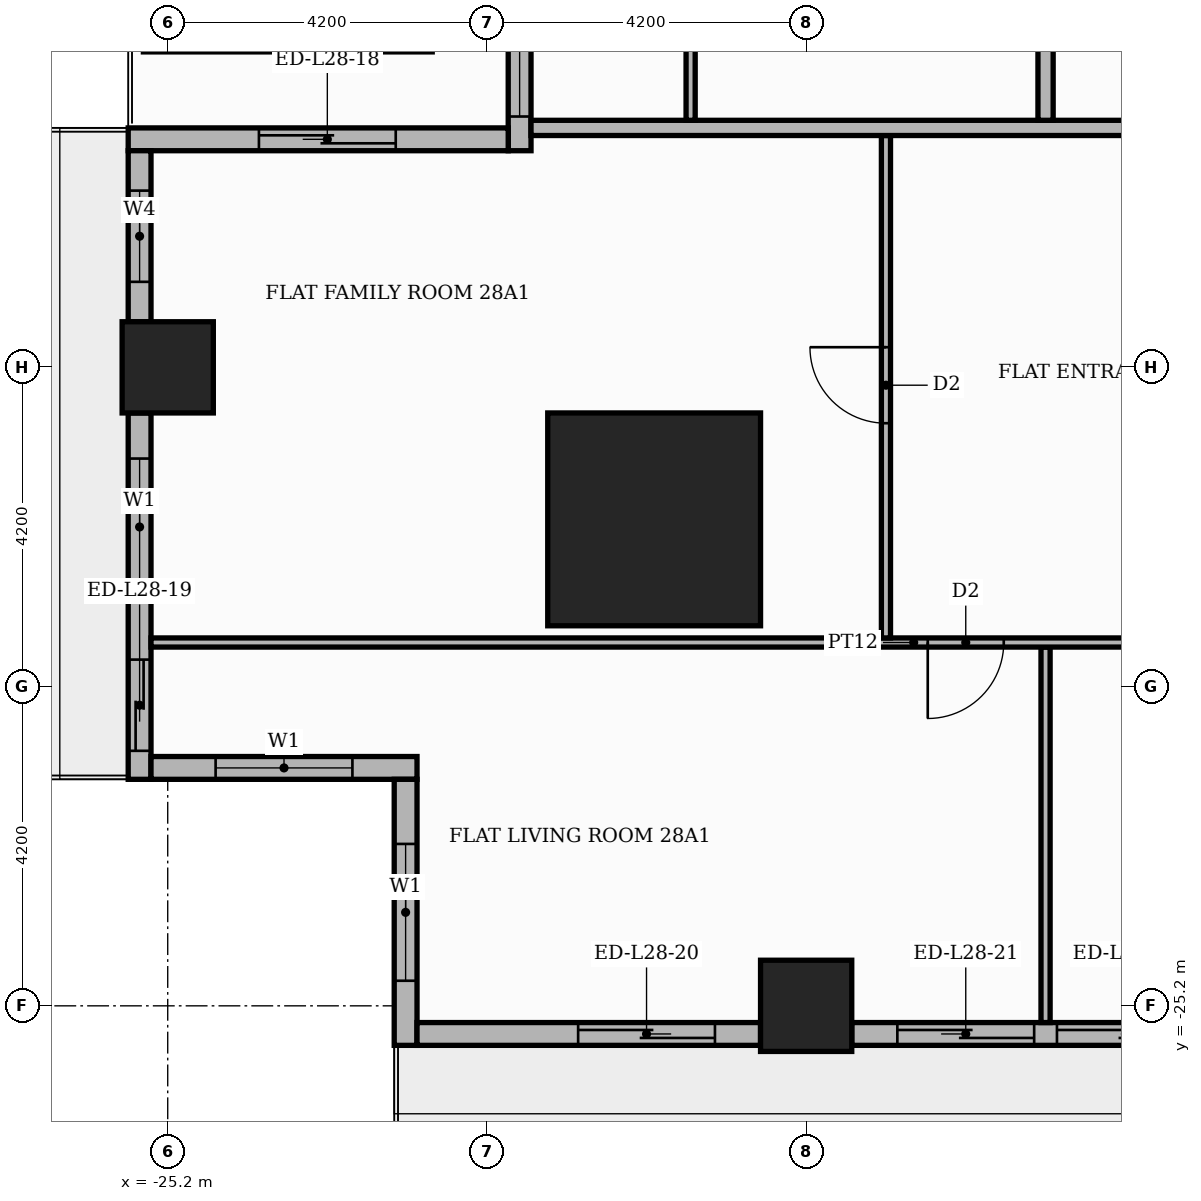
"""IFC4 building model, lengths in metres.
Left out: names, types, materials, properties, quantities, classifications, styles, units other than length and angle.
Written with IfcOpenShell. Run it as: python <this file> out.ifc"""

import sys

from ifc_helpers import new_model, si_unit, direction, frame, frame_2d, origin, origin_2d, place, context, subcontext, project, spatial, rectangle, extrude, element, fill, save


model = new_model("IFC4")
c1 = context("Model", 3, precision=1e-05, world=origin(), true_north=direction((0.0, 1.0)))
c2 = subcontext(c1, "Body", "Model", "MODEL_VIEW")
j1 = project(units=[si_unit("LENGTHUNIT", "METRE"), si_unit("PLANEANGLEUNIT", "RADIAN")], contexts=[c1])
p1 = place(None, origin())
s1 = spatial("IfcSite", under=j1, at=p1, CompositionType="ELEMENT")
p2 = place(p1, origin())
s2 = spatial("IfcBuilding", under=s1, at=p2, CompositionType="ELEMENT")
p3 = place(p2, frame((0.0, 0.0, 118.2)))
s3 = spatial("IfcBuildingStorey", under=s2, at=p3, CompositionType="ELEMENT", Elevation=118.2)
p4 = place(p3, frame((-18.8, -18.8, 0.0), z_axis=(0.0, 0.0, 1.0), x_axis=(1.0, 0.0, 0.0)))
e1 = element("IfcColumn", 1, at=p4, inside=s3, PredefinedType="COLUMN", context=c2, shape_type="SweptSolid", body=[
    extrude(rectangle(XDim=2.8, YDim=2.8, at=origin_2d()), origin(), (0.0, 0.0, 1.0), 3.9),
])
for number, where, z_axis, x_axis in (
    (2, (-16.8, -25.2, 0.0), (0.0, 0.0, 1.0), (1.0, 0.0, 0.0)),
    (3, (-25.2, -16.8, 0.0), (0.0, 0.0, 1.0), (1.0, 0.0, 0.0)),
):
    element("IfcColumn", number, at=place(p3, frame(where, z_axis=z_axis, x_axis=x_axis)), inside=s3, PredefinedType="COLUMN", context=c2, shape_type="SweptSolid", body=[
        extrude(rectangle(XDim=1.2, YDim=1.2, at=origin_2d()), origin(), (0.0, 0.0, 1.0), 3.9),
    ])
p5 = place(p3, frame((-20.57, 13.65, 0.0), z_axis=(0.0, 0.0, 1.0), x_axis=(0.0, -1.0, 0.0)))
e4 = element("IfcWall", 4, at=p5, inside=s3, PredefinedType="STANDARD", context=c2, shape_type="SweptSolid", body=[
    extrude(rectangle(XDim=27.6, YDim=0.3, at=frame_2d((13.8, 0.0))), origin(), (0.0, 0.0, 1.0), 3.48),
])
p6 = place(p5, frame((0.15, 0.0, 0.9)))
e5 = element("IfcOpeningElement", 5, at=p6, cuts=e4, PredefinedType="OPENING", context=c2, shape_type="SweptSolid", body=[
    extrude(rectangle(XDim=6.0, YDim=2.1, at=frame_2d((3.0, 1.05))), frame((0.0, 0.16, 0.0), z_axis=(0.0, -1.0, 0.0), x_axis=(1.0, 0.0, 0.0)), (0.0, 0.0, 1.0), 0.32),
])
p7 = place(p5, frame((6.45, 0.0, 0.9)))
e6 = element("IfcOpeningElement", 6, at=p7, cuts=e4, PredefinedType="OPENING", context=c2, shape_type="SweptSolid", body=[
    extrude(rectangle(XDim=1.8, YDim=2.1, at=frame_2d((0.9, 1.05))), frame((0.0, 0.16, 0.0), z_axis=(0.0, -1.0, 0.0), x_axis=(1.0, 0.0, 0.0)), (0.0, 0.0, 1.0), 0.32),
])
p8 = place(p5, frame((8.55, 0.0, 0.9)))
e7 = element("IfcOpeningElement", 7, at=p8, cuts=e4, PredefinedType="OPENING", context=c2, shape_type="SweptSolid", body=[
    extrude(rectangle(XDim=6.0, YDim=2.1, at=frame_2d((3.0, 1.05))), frame((0.0, 0.16, 0.0), z_axis=(0.0, -1.0, 0.0), x_axis=(1.0, 0.0, 0.0)), (0.0, 0.0, 1.0), 0.32),
])
p9 = place(p5, frame((14.85, 0.0, 0.9)))
e8 = element("IfcOpeningElement", 8, at=p9, cuts=e4, PredefinedType="OPENING", context=c2, shape_type="SweptSolid", body=[
    extrude(rectangle(XDim=6.0, YDim=2.1, at=frame_2d((3.0, 1.05))), frame((0.0, 0.16, 0.0), z_axis=(0.0, -1.0, 0.0), x_axis=(1.0, 0.0, 0.0)), (0.0, 0.0, 1.0), 0.32),
])
p10 = place(p5, frame((21.15, 0.0, 0.9)))
e9 = element("IfcOpeningElement", 9, at=p10, cuts=e4, PredefinedType="OPENING", context=c2, shape_type="SweptSolid", body=[
    extrude(rectangle(XDim=6.0, YDim=2.1, at=frame_2d((3.0, 1.05))), frame((0.0, 0.16, 0.0), z_axis=(0.0, -1.0, 0.0), x_axis=(1.0, 0.0, 0.0)), (0.0, 0.0, 1.0), 0.32),
])
p11 = place(p3, frame((-20.72, -13.8, 0.0), z_axis=(0.0, 0.0, 1.0), x_axis=(-1.0, 0.0, 0.0)))
e10 = element("IfcWall", 10, at=p11, inside=s3, PredefinedType="STANDARD", context=c2, shape_type="SweptSolid", body=[
    extrude(rectangle(XDim=5.0, YDim=0.3, at=frame_2d((2.5, 0.0))), origin(), (0.0, 0.0, 1.0), 3.48),
])
p12 = place(p11, frame((1.48, 0.0, 0.0)))
e11 = element("IfcOpeningElement", 11, at=p12, cuts=e10, PredefinedType="OPENING", context=c2, shape_type="SweptSolid", body=[
    extrude(rectangle(XDim=1.8, YDim=2.4, at=frame_2d((0.9, 1.2))), frame((0.0, 0.16, 0.0), z_axis=(0.0, -1.0, 0.0), x_axis=(1.0, 0.0, 0.0)), (0.0, 0.0, 1.0), 0.32),
])
p13 = place(p3, frame((-25.57, -13.95, 0.0), z_axis=(0.0, 0.0, 1.0), x_axis=(0.0, -1.0, 0.0)))
e12 = element("IfcWall", 12, at=p13, inside=s3, PredefinedType="STANDARD", context=c2, shape_type="SweptSolid", body=[
    extrude(rectangle(XDim=2.25, YDim=0.3, at=frame_2d((1.125, 0.0))), origin(), (0.0, 0.0, 1.0), 3.48),
])
p14 = place(p13, frame((0.525, 0.0, 0.9)))
e13 = element("IfcOpeningElement", 13, at=p14, cuts=e12, PredefinedType="OPENING", context=c2, shape_type="SweptSolid", body=[
    extrude(rectangle(XDim=1.2, YDim=2.1, at=frame_2d((0.6, 1.05))), frame((0.0, 0.16, 0.0), z_axis=(0.0, -1.0, 0.0), x_axis=(1.0, 0.0, 0.0)), (0.0, 0.0, 1.0), 0.32),
])
p15 = place(p3, frame((-25.57, -17.4, 0.0), z_axis=(0.0, 0.0, 1.0), x_axis=(0.0, -1.0, 0.0)))
e14 = element("IfcWall", 14, at=p15, inside=s3, PredefinedType="STANDARD", context=c2, shape_type="SweptSolid", body=[
    extrude(rectangle(XDim=4.82, YDim=0.3, at=frame_2d((2.41, 0.0))), origin(), (0.0, 0.0, 1.0), 3.48),
])
p16 = place(p15, frame((0.6, 0.0, 0.9)))
e15 = element("IfcOpeningElement", 15, at=p16, cuts=e14, PredefinedType="OPENING", context=c2, shape_type="SweptSolid", body=[
    extrude(rectangle(XDim=1.8, YDim=2.1, at=frame_2d((0.9, 1.05))), frame((0.0, 0.16, 0.0), z_axis=(0.0, -1.0, 0.0), x_axis=(1.0, 0.0, 0.0)), (0.0, 0.0, 1.0), 0.32),
])
p17 = place(p15, frame((3.245, 0.0, 0.0)))
e16 = element("IfcOpeningElement", 16, at=p17, cuts=e14, PredefinedType="OPENING", context=c2, shape_type="SweptSolid", body=[
    extrude(rectangle(XDim=1.2, YDim=2.4, at=frame_2d((0.6, 1.2))), frame((0.0, 0.16, 0.0), z_axis=(0.0, -1.0, 0.0), x_axis=(1.0, 0.0, 0.0)), (0.0, 0.0, 1.0), 0.32),
])
p18 = place(p3, frame((-25.42, -22.07, 0.0), z_axis=(0.0, 0.0, 1.0), x_axis=(1.0, 0.0, 0.0)))
e17 = element("IfcWall", 17, at=p18, inside=s3, PredefinedType="STANDARD", context=c2, shape_type="SweptSolid", body=[
    extrude(rectangle(XDim=3.5, YDim=0.3, at=frame_2d((1.75, 0.0))), origin(), (0.0, 0.0, 1.0), 3.48),
])
p19 = place(p18, frame((0.85, 0.0, 0.9)))
e18 = element("IfcOpeningElement", 18, at=p19, cuts=e17, PredefinedType="OPENING", context=c2, shape_type="SweptSolid", body=[
    extrude(rectangle(XDim=1.8, YDim=2.1, at=frame_2d((0.9, 1.05))), frame((0.0, 0.16, 0.0), z_axis=(0.0, -1.0, 0.0), x_axis=(1.0, 0.0, 0.0)), (0.0, 0.0, 1.0), 0.32),
])
p20 = place(p3, frame((-22.07, -22.22, 0.0), z_axis=(0.0, 0.0, 1.0), x_axis=(0.0, -1.0, 0.0)))
e19 = element("IfcWall", 19, at=p20, inside=s3, PredefinedType="STANDARD", context=c2, shape_type="SweptSolid", body=[
    extrude(rectangle(XDim=3.5, YDim=0.3, at=frame_2d((1.75, 0.0))), origin(), (0.0, 0.0, 1.0), 3.48),
])
p21 = place(p20, frame((0.85, 0.0, 0.9)))
e20 = element("IfcOpeningElement", 20, at=p21, cuts=e19, PredefinedType="OPENING", context=c2, shape_type="SweptSolid", body=[
    extrude(rectangle(XDim=1.8, YDim=2.1, at=frame_2d((0.9, 1.05))), frame((0.0, 0.16, 0.0), z_axis=(0.0, -1.0, 0.0), x_axis=(1.0, 0.0, 0.0)), (0.0, 0.0, 1.0), 0.32),
])
p22 = place(p3, frame((-21.92, -25.57, 0.0), z_axis=(0.0, 0.0, 1.0), x_axis=(1.0, 0.0, 0.0)))
e21 = element("IfcWall", 21, at=p22, inside=s3, PredefinedType="STANDARD", context=c2, shape_type="SweptSolid", body=[
    extrude(rectangle(XDim=4.52, YDim=0.3, at=frame_2d((2.26, 0.0))), origin(), (0.0, 0.0, 1.0), 3.48),
])
p23 = place(p22, frame((2.12, 0.0, 0.0)))
e22 = element("IfcOpeningElement", 22, at=p23, cuts=e21, PredefinedType="OPENING", context=c2, shape_type="SweptSolid", body=[
    extrude(rectangle(XDim=1.8, YDim=2.4, at=frame_2d((0.9, 1.2))), frame((0.0, 0.16, 0.0), z_axis=(0.0, -1.0, 0.0), x_axis=(1.0, 0.0, 0.0)), (0.0, 0.0, 1.0), 0.32),
])
p24 = place(p3, frame((-16.2, -25.57, 0.0), z_axis=(0.0, 0.0, 1.0), x_axis=(1.0, 0.0, 0.0)))
e23 = element("IfcWall", 23, at=p24, inside=s3, PredefinedType="STANDARD", context=c2, shape_type="SweptSolid", body=[
    extrude(rectangle(XDim=7.2, YDim=0.3, at=frame_2d((3.6, 0.0))), origin(), (0.0, 0.0, 1.0), 3.48),
])
p25 = place(p24, frame((0.6, 0.0, 0.0)))
e24 = element("IfcOpeningElement", 24, at=p25, cuts=e23, PredefinedType="OPENING", context=c2, shape_type="SweptSolid", body=[
    extrude(rectangle(XDim=1.8, YDim=2.4, at=frame_2d((0.9, 1.2))), frame((0.0, 0.16, 0.0), z_axis=(0.0, -1.0, 0.0), x_axis=(1.0, 0.0, 0.0)), (0.0, 0.0, 1.0), 0.32),
])
p26 = place(p24, frame((2.7, 0.0, 0.0)))
e25 = element("IfcOpeningElement", 25, at=p26, cuts=e23, PredefinedType="OPENING", context=c2, shape_type="SweptSolid", body=[
    extrude(rectangle(XDim=1.8, YDim=2.4, at=frame_2d((0.9, 1.2))), frame((0.0, 0.16, 0.0), z_axis=(0.0, -1.0, 0.0), x_axis=(1.0, 0.0, 0.0)), (0.0, 0.0, 1.0), 0.32),
])
p27 = place(p24, frame((4.8, 0.0, 0.9)))
e26 = element("IfcOpeningElement", 26, at=p27, cuts=e23, PredefinedType="OPENING", context=c2, shape_type="SweptSolid", body=[
    extrude(rectangle(XDim=1.8, YDim=2.1, at=frame_2d((0.9, 1.05))), frame((0.0, 0.16, 0.0), z_axis=(0.0, -1.0, 0.0), x_axis=(1.0, 0.0, 0.0)), (0.0, 0.0, 1.0), 0.32),
])
p28 = place(p3, frame((-13.65, -25.42, 0.0), z_axis=(0.0, 0.0, 1.0), x_axis=(0.0, 1.0, 0.0)))
e27 = element("IfcWall", 27, at=p28, inside=s3, PredefinedType="PARTITIONING", context=c2, shape_type="SweptSolid", body=[
    extrude(rectangle(XDim=4.94, YDim=0.12, at=frame_2d((2.47, 0.0))), origin(), (0.0, 0.0, 1.0), 3.48),
])
p29 = place(p3, frame((-25.42, -20.42, 0.0), z_axis=(0.0, 0.0, 1.0), x_axis=(1.0, 0.0, 0.0)))
e28 = element("IfcWall", 28, at=p29, inside=s3, PredefinedType="PARTITIONING", context=c2, shape_type="SweptSolid", body=[
    extrude(rectangle(XDim=20.07, YDim=0.12, at=frame_2d((10.035, 0.0))), origin(), (0.0, 0.0, 1.0), 3.48),
])
p30 = place(p29, frame((10.22, 0.0, 0.0)))
e29 = element("IfcOpeningElement", 29, at=p30, cuts=e28, PredefinedType="OPENING", context=c2, shape_type="SweptSolid", body=[
    extrude(rectangle(XDim=1.0, YDim=2.1, at=frame_2d((0.5, 1.05))), frame((0.0, 0.07, 0.0), z_axis=(0.0, -1.0, 0.0), x_axis=(1.0, 0.0, 0.0)), (0.0, 0.0, 1.0), 0.14),
])
p31 = place(p29, frame((13.42, 0.0, 0.0)))
e30 = element("IfcOpeningElement", 30, at=p31, cuts=e28, PredefinedType="OPENING", context=c2, shape_type="SweptSolid", body=[
    extrude(rectangle(XDim=0.9, YDim=2.1, at=frame_2d((0.45, 1.05))), frame((0.0, 0.07, 0.0), z_axis=(0.0, -1.0, 0.0), x_axis=(1.0, 0.0, 0.0)), (0.0, 0.0, 1.0), 0.14),
])
p32 = place(p3, frame((-15.75, -20.36, 0.0), z_axis=(0.0, 0.0, 1.0), x_axis=(0.0, 1.0, 0.0)))
e31 = element("IfcWall", 31, at=p32, inside=s3, PredefinedType="PARTITIONING", context=c2, shape_type="SweptSolid", body=[
    extrude(rectangle(XDim=6.61, YDim=0.12, at=frame_2d((3.305, 0.0))), origin(), (0.0, 0.0, 1.0), 3.48),
])
p33 = place(p32, frame((2.825, 0.0, 0.0)))
e32 = element("IfcOpeningElement", 32, at=p33, cuts=e31, PredefinedType="OPENING", context=c2, shape_type="SweptSolid", body=[
    extrude(rectangle(XDim=1.0, YDim=2.1, at=frame_2d((0.5, 1.05))), frame((0.0, 0.07, 0.0), z_axis=(0.0, -1.0, 0.0), x_axis=(1.0, 0.0, 0.0)), (0.0, 0.0, 1.0), 0.14),
])
p34 = place(p3, frame((-20.42, -13.65, 0.0), z_axis=(0.0, 0.0, 1.0), x_axis=(1.0, 0.0, 0.0)))
e33 = element("IfcWall", 33, at=p34, inside=s3, PredefinedType="PARTITIONING", context=c2, shape_type="SweptSolid", body=[
    extrude(rectangle(XDim=34.07, YDim=0.2, at=frame_2d((17.035, 0.0))), origin(), (0.0, 0.0, 1.0), 3.48),
])
p35 = place(p34, frame((8.32, 0.0, 0.0)))
e34 = element("IfcOpeningElement", 34, at=p35, cuts=e33, PredefinedType="OPENING", context=c2, shape_type="SweptSolid", body=[
    extrude(rectangle(XDim=1.1, YDim=2.4, at=frame_2d((0.55, 1.2))), frame((0.0, 0.11, 0.0), z_axis=(0.0, -1.0, 0.0), x_axis=(1.0, 0.0, 0.0)), (0.0, 0.0, 1.0), 0.22),
])
p36 = place(p34, frame((20.92, 0.0, 0.0)))
e35 = element("IfcOpeningElement", 35, at=p36, cuts=e33, PredefinedType="OPENING", context=c2, shape_type="SweptSolid", body=[
    extrude(rectangle(XDim=1.1, YDim=2.4, at=frame_2d((0.55, 1.2))), frame((0.0, 0.11, 0.0), z_axis=(0.0, -1.0, 0.0), x_axis=(1.0, 0.0, 0.0)), (0.0, 0.0, 1.0), 0.22),
])
p37 = place(p3, frame((-18.32, -13.55, 0.0), z_axis=(0.0, 0.0, 1.0), x_axis=(0.0, 1.0, 0.0)))
e36 = element("IfcWall", 36, at=p37, inside=s3, PredefinedType="PARTITIONING", context=c2, shape_type="SweptSolid", body=[
    extrude(rectangle(XDim=3.29, YDim=0.12, at=frame_2d((1.645, 0.0))), origin(), (0.0, 0.0, 1.0), 3.48),
])
p38 = place(p37, frame((1.175, 0.0, 0.0)))
e37 = element("IfcOpeningElement", 37, at=p38, cuts=e36, PredefinedType="OPENING", context=c2, shape_type="SweptSolid", body=[
    extrude(rectangle(XDim=0.9, YDim=2.1, at=frame_2d((0.45, 1.05))), frame((0.0, 0.07, 0.0), z_axis=(0.0, -1.0, 0.0), x_axis=(1.0, 0.0, 0.0)), (0.0, 0.0, 1.0), 0.14),
])
p39 = place(p3, frame((-13.65, -13.55, 0.0), z_axis=(0.0, 0.0, 1.0), x_axis=(0.0, 1.0, 0.0)))
e38 = element("IfcWall", 38, at=p39, inside=s3, PredefinedType="PARTITIONING", context=c2, shape_type="SweptSolid", body=[
    extrude(rectangle(XDim=18.7, YDim=0.2, at=frame_2d((9.35, 0.0))), origin(), (0.0, 0.0, 1.0), 3.48),
])
p40 = place(p39, frame((14.05, 0.0, 0.0)))
e39 = element("IfcOpeningElement", 39, at=p40, cuts=e38, PredefinedType="OPENING", context=c2, shape_type="SweptSolid", body=[
    extrude(rectangle(XDim=1.1, YDim=2.4, at=frame_2d((0.55, 1.2))), frame((0.0, 0.11, 0.0), z_axis=(0.0, -1.0, 0.0), x_axis=(1.0, 0.0, 0.0)), (0.0, 0.0, 1.0), 0.22),
])
p41 = place(p10, origin())
e40 = element("IfcWindow", 40, at=p41, inside=s3, PartitioningType="SINGLE_PANEL", PredefinedType="WINDOW", context=c2, shape_type="SweptSolid", body=[
    extrude(rectangle(XDim=6.0, YDim=2.1, at=frame_2d((3.0, 1.05))), frame((0.0, 0.03, 0.0), z_axis=(0.0, -1.0, 0.0), x_axis=(1.0, 0.0, 0.0)), (0.0, 0.0, 1.0), 0.06),
])
fill(e9, e40)
p42 = place(p12, origin())
e41 = element("IfcDoor", 41, at=p42, inside=s3, OperationType="SLIDING_TO_RIGHT", PredefinedType="DOOR", context=c2, shape_type="SweptSolid", body=[
    extrude(rectangle(XDim=1.8, YDim=2.4, at=frame_2d((0.9, 1.2))), frame((0.0, 0.025, 0.0), z_axis=(0.0, -1.0, 0.0), x_axis=(1.0, 0.0, 0.0)), (0.0, 0.0, 1.0), 0.05),
])
fill(e11, e41)
p43 = place(p14, origin())
e42 = element("IfcWindow", 42, at=p43, inside=s3, PartitioningType="SINGLE_PANEL", PredefinedType="WINDOW", context=c2, shape_type="SweptSolid", body=[
    extrude(rectangle(XDim=1.2, YDim=2.1, at=frame_2d((0.6, 1.05))), frame((0.0, 0.03, 0.0), z_axis=(0.0, -1.0, 0.0), x_axis=(1.0, 0.0, 0.0)), (0.0, 0.0, 1.0), 0.06),
])
fill(e13, e42)
p44 = place(p16, origin())
e43 = element("IfcWindow", 43, at=p44, inside=s3, PartitioningType="SINGLE_PANEL", PredefinedType="WINDOW", context=c2, shape_type="SweptSolid", body=[
    extrude(rectangle(XDim=1.8, YDim=2.1, at=frame_2d((0.9, 1.05))), frame((0.0, 0.03, 0.0), z_axis=(0.0, -1.0, 0.0), x_axis=(1.0, 0.0, 0.0)), (0.0, 0.0, 1.0), 0.06),
])
fill(e15, e43)
p45 = place(p17, origin())
e44 = element("IfcDoor", 44, at=p45, inside=s3, OperationType="SLIDING_TO_RIGHT", PredefinedType="DOOR", context=c2, shape_type="SweptSolid", body=[
    extrude(rectangle(XDim=1.2, YDim=2.4, at=frame_2d((0.6, 1.2))), frame((0.0, 0.025, 0.0), z_axis=(0.0, -1.0, 0.0), x_axis=(1.0, 0.0, 0.0)), (0.0, 0.0, 1.0), 0.05),
])
fill(e16, e44)
p46 = place(p19, origin())
e45 = element("IfcWindow", 45, at=p46, inside=s3, PartitioningType="SINGLE_PANEL", PredefinedType="WINDOW", context=c2, shape_type="SweptSolid", body=[
    extrude(rectangle(XDim=1.8, YDim=2.1, at=frame_2d((0.9, 1.05))), frame((0.0, 0.03, 0.0), z_axis=(0.0, -1.0, 0.0), x_axis=(1.0, 0.0, 0.0)), (0.0, 0.0, 1.0), 0.06),
])
fill(e18, e45)
p47 = place(p21, origin())
e46 = element("IfcWindow", 46, at=p47, inside=s3, PartitioningType="SINGLE_PANEL", PredefinedType="WINDOW", context=c2, shape_type="SweptSolid", body=[
    extrude(rectangle(XDim=1.8, YDim=2.1, at=frame_2d((0.9, 1.05))), frame((0.0, 0.03, 0.0), z_axis=(0.0, -1.0, 0.0), x_axis=(1.0, 0.0, 0.0)), (0.0, 0.0, 1.0), 0.06),
])
fill(e20, e46)
p48 = place(p23, origin())
e47 = element("IfcDoor", 47, at=p48, inside=s3, OperationType="SLIDING_TO_RIGHT", PredefinedType="DOOR", context=c2, shape_type="SweptSolid", body=[
    extrude(rectangle(XDim=1.8, YDim=2.4, at=frame_2d((0.9, 1.2))), frame((0.0, 0.025, 0.0), z_axis=(0.0, -1.0, 0.0), x_axis=(1.0, 0.0, 0.0)), (0.0, 0.0, 1.0), 0.05),
])
fill(e22, e47)
p49 = place(p25, origin())
e48 = element("IfcDoor", 48, at=p49, inside=s3, OperationType="SLIDING_TO_LEFT", PredefinedType="DOOR", context=c2, shape_type="SweptSolid", body=[
    extrude(rectangle(XDim=1.8, YDim=2.4, at=frame_2d((0.9, 1.2))), frame((0.0, 0.025, 0.0), z_axis=(0.0, -1.0, 0.0), x_axis=(1.0, 0.0, 0.0)), (0.0, 0.0, 1.0), 0.05),
])
fill(e24, e48)
p50 = place(p26, origin())
e49 = element("IfcDoor", 49, at=p50, inside=s3, OperationType="SLIDING_TO_RIGHT", PredefinedType="DOOR", context=c2, shape_type="SweptSolid", body=[
    extrude(rectangle(XDim=1.8, YDim=2.4, at=frame_2d((0.9, 1.2))), frame((0.0, 0.025, 0.0), z_axis=(0.0, -1.0, 0.0), x_axis=(1.0, 0.0, 0.0)), (0.0, 0.0, 1.0), 0.05),
])
fill(e25, e49)
p51 = place(p33, origin())
e50 = element("IfcDoor", 50, at=p51, inside=s3, OperationType="SINGLE_SWING_RIGHT", PredefinedType="DOOR", context=c2, shape_type="SweptSolid", body=[
    extrude(rectangle(XDim=1.0, YDim=2.1, at=frame_2d((0.5, 1.05))), frame((0.0, 0.025, 0.0), z_axis=(0.0, -1.0, 0.0), x_axis=(1.0, 0.0, 0.0)), (0.0, 0.0, 1.0), 0.05),
])
fill(e32, e50)
p52 = place(p30, frame((1.0, 0.0, 0.0), z_axis=(0.0, 0.0, 1.0), x_axis=(-1.0, 0.0, 0.0)))
e51 = element("IfcDoor", 51, at=p52, inside=s3, OperationType="SINGLE_SWING_LEFT", PredefinedType="DOOR", context=c2, shape_type="SweptSolid", body=[
    extrude(rectangle(XDim=1.0, YDim=2.1, at=frame_2d((0.5, 1.05))), frame((0.0, 0.025, 0.0), z_axis=(0.0, -1.0, 0.0), x_axis=(1.0, 0.0, 0.0)), (0.0, 0.0, 1.0), 0.05),
])
fill(e29, e51)
save(model, sys.argv[1])
